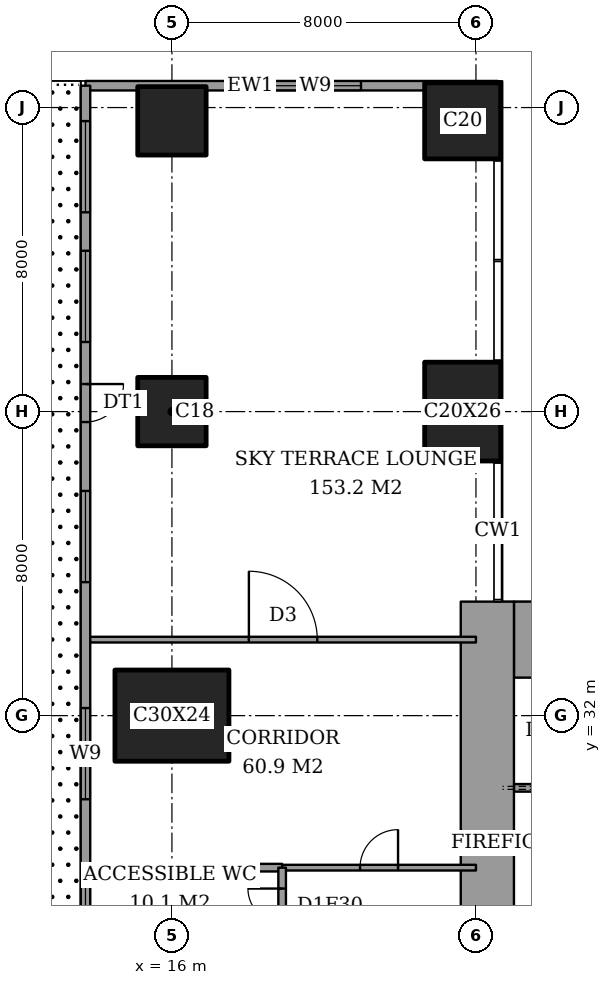
"""IFC4 building model, lengths in metres.
Left out: names, types, materials, properties, quantities, classifications, styles, units other than length and angle.
Written with IfcOpenShell. Run it as: python <this file> out.ifc"""

import sys

from ifc_helpers import new_model, si_unit, direction, frame, frame_2d, origin, origin_2d, place, context, subcontext, project, spatial, rectangle, extrude, element, fill, save


model = new_model("IFC4")
c1 = context("Model", 3, precision=1e-05, world=origin(), true_north=direction((0.0, 1.0)))
c2 = subcontext(c1, "Body", "Model", "MODEL_VIEW")
j1 = project(units=[si_unit("LENGTHUNIT", "METRE"), si_unit("PLANEANGLEUNIT", "RADIAN")], contexts=[c1])
p1 = place(None, origin())
s1 = spatial("IfcSite", under=j1, at=p1, CompositionType="ELEMENT")
p2 = place(p1, origin())
s2 = spatial("IfcBuilding", under=s1, at=p2, CompositionType="ELEMENT")
p3 = place(p2, frame((0.0, 0.0, 221.8)))
s3 = spatial("IfcBuildingStorey", under=s2, at=p3, CompositionType="ELEMENT", Elevation=221.8)
p4 = place(p3, frame((16.0, 32.0, 0.0), z_axis=(0.0, 0.0, 1.0), x_axis=(1.0, 0.0, 0.0)))
e1 = element("IfcColumn", 1, at=p4, inside=s3, PredefinedType="COLUMN", context=c2, shape_type="SweptSolid", body=[
    extrude(rectangle(XDim=3.0, YDim=2.4, at=origin_2d()), origin(), (0.0, 0.0, 1.0), 3.6),
])
for number, where, z_axis, x_axis in (
    (2, (16.0, 40.0, 0.0), (0.0, 0.0, 1.0), (1.0, 0.0, 0.0)),
    (3, (16.0, 47.65, 0.0), (0.0, 0.0, 1.0), (1.0, 0.0, 0.0)),
):
    element("IfcColumn", number, at=place(p3, frame(where, z_axis=z_axis, x_axis=x_axis)), inside=s3, PredefinedType="COLUMN", context=c2, shape_type="SweptSolid", body=[
        extrude(rectangle(XDim=1.8, YDim=1.8, at=origin_2d()), origin(), (0.0, 0.0, 1.0), 3.6),
    ])
p5 = place(p3, frame((23.65, 40.0, 0.0), z_axis=(0.0, 0.0, 1.0), x_axis=(1.0, 0.0, 0.0)))
e4 = element("IfcColumn", 4, at=p5, inside=s3, PredefinedType="COLUMN", context=c2, shape_type="SweptSolid", body=[
    extrude(rectangle(XDim=2.0, YDim=2.6, at=origin_2d()), origin(), (0.0, 0.0, 1.0), 3.6),
])
p6 = place(p3, frame((23.65, 47.65, 0.0), z_axis=(0.0, 0.0, 1.0), x_axis=(1.0, 0.0, 0.0)))
e5 = element("IfcColumn", 5, at=p6, inside=s3, PredefinedType="COLUMN", context=c2, shape_type="SweptSolid", body=[
    extrude(rectangle(XDim=2.0, YDim=2.0, at=origin_2d()), origin(), (0.0, 0.0, 1.0), 3.6),
])
p7 = place(p3, frame((25.0, 34.0, 0.0), z_axis=(0.0, 0.0, 1.0), x_axis=(1.0, 0.0, 0.0)))
e6 = element("IfcWall", 6, at=p7, inside=s3, PredefinedType="SHEAR", context=c2, shape_type="SweptSolid", body=[
    extrude(rectangle(XDim=3.15, YDim=2.0, at=frame_2d((1.575, 0.0))), origin(), (0.0, 0.0, 1.0), 3.6),
])
p8 = place(p3, frame((24.3, 23.15, 0.0), z_axis=(0.0, 0.0, 1.0), x_axis=(0.0, 1.0, 0.0)))
e7 = element("IfcWall", 7, at=p8, inside=s3, PredefinedType="SHEAR", context=c2, shape_type="SweptSolid", body=[
    extrude(rectangle(XDim=11.85, YDim=1.4, at=frame_2d((5.925, 0.0))), origin(), (0.0, 0.0, 1.0), 3.6),
])
p9 = place(p8, frame((0.75, 0.0, 0.0)))
e8 = element("IfcOpeningElement", 8, at=p9, cuts=e7, PredefinedType="OPENING", context=c2, shape_type="SweptSolid", body=[
    extrude(rectangle(XDim=1.8, YDim=2.4, at=frame_2d((0.9, 1.2))), frame((0.0, 0.71, 0.0), z_axis=(0.0, -1.0, 0.0), x_axis=(1.0, 0.0, 0.0)), (0.0, 0.0, 1.0), 1.42),
])
p10 = place(p3, frame((24.575, 48.575, 0.0), z_axis=(0.0, 0.0, 1.0), x_axis=(-1.0, 0.0, 0.0)))
e9 = element("IfcWall", 9, at=p10, inside=s3, PredefinedType="SOLIDWALL", context=c2, shape_type="SweptSolid", body=[
    extrude(rectangle(XDim=10.85, YDim=0.25, at=frame_2d((5.425, 0.0))), origin(), (0.0, 0.0, 1.0), 3.6),
])
p11 = place(p10, frame((3.6, 0.0, 0.2)))
e10 = element("IfcOpeningElement", 10, at=p11, cuts=e9, PredefinedType="OPENING", context=c2, shape_type="SweptSolid", body=[
    extrude(rectangle(XDim=2.4, YDim=2.4, at=frame_2d((1.2, 1.2))), frame((0.0, 0.135, 0.0), z_axis=(0.0, -1.0, 0.0), x_axis=(1.0, 0.0, 0.0)), (0.0, 0.0, 1.0), 0.27),
])
p12 = place(p3, frame((13.725, 48.575, 0.0), z_axis=(0.0, 0.0, 1.0), x_axis=(0.0, -1.0, 0.0)))
e11 = element("IfcWall", 11, at=p12, inside=s3, PredefinedType="SOLIDWALL", context=c2, shape_type="SweptSolid", body=[
    extrude(rectangle(XDim=49.15, YDim=0.25, at=frame_2d((24.575, 0.0))), origin(), (0.0, 0.0, 1.0), 3.6),
])
p13 = place(p12, frame((7.85, 0.0, 0.0)))
e12 = element("IfcOpeningElement", 12, at=p13, cuts=e11, PredefinedType="OPENING", context=c2, shape_type="SweptSolid", body=[
    extrude(rectangle(XDim=1.0, YDim=2.4, at=frame_2d((0.5, 1.2))), frame((0.0, 0.135, 0.0), z_axis=(0.0, -1.0, 0.0), x_axis=(1.0, 0.0, 0.0)), (0.0, 0.0, 1.0), 0.27),
])
p14 = place(p12, frame((0.931, 0.0, 0.2)))
e13 = element("IfcOpeningElement", 13, at=p14, cuts=e11, PredefinedType="OPENING", context=c2, shape_type="SweptSolid", body=[
    extrude(rectangle(XDim=2.4, YDim=2.4, at=frame_2d((1.2, 1.2))), frame((0.0, 0.135, 0.0), z_axis=(0.0, -1.0, 0.0), x_axis=(1.0, 0.0, 0.0)), (0.0, 0.0, 1.0), 0.27),
])
p15 = place(p12, frame((4.344, 0.0, 0.2)))
e14 = element("IfcOpeningElement", 14, at=p15, cuts=e11, PredefinedType="OPENING", context=c2, shape_type="SweptSolid", body=[
    extrude(rectangle(XDim=2.4, YDim=2.4, at=frame_2d((1.2, 1.2))), frame((0.0, 0.135, 0.0), z_axis=(0.0, -1.0, 0.0), x_axis=(1.0, 0.0, 0.0)), (0.0, 0.0, 1.0), 0.27),
])
p16 = place(p12, frame((10.663, 0.0, 0.2)))
e15 = element("IfcOpeningElement", 15, at=p16, cuts=e11, PredefinedType="OPENING", context=c2, shape_type="SweptSolid", body=[
    extrude(rectangle(XDim=2.4, YDim=2.4, at=frame_2d((1.2, 1.2))), frame((0.0, 0.135, 0.0), z_axis=(0.0, -1.0, 0.0), x_axis=(1.0, 0.0, 0.0)), (0.0, 0.0, 1.0), 0.27),
])
p17 = place(p12, frame((16.375, 0.0, 0.2)))
e16 = element("IfcOpeningElement", 16, at=p17, cuts=e11, PredefinedType="OPENING", context=c2, shape_type="SweptSolid", body=[
    extrude(rectangle(XDim=2.4, YDim=2.4, at=frame_2d((1.2, 1.2))), frame((0.0, 0.135, 0.0), z_axis=(0.0, -1.0, 0.0), x_axis=(1.0, 0.0, 0.0)), (0.0, 0.0, 1.0), 0.27),
])
p18 = place(p12, frame((20.975, 0.0, 0.2)))
e17 = element("IfcOpeningElement", 17, at=p18, cuts=e11, PredefinedType="OPENING", context=c2, shape_type="SweptSolid", body=[
    extrude(rectangle(XDim=1.2, YDim=2.4, at=frame_2d((0.6, 1.2))), frame((0.0, 0.135, 0.0), z_axis=(0.0, -1.0, 0.0), x_axis=(1.0, 0.0, 0.0)), (0.0, 0.0, 1.0), 0.27),
])
p19 = place(p12, frame((22.975, 0.0, 0.2)))
e18 = element("IfcOpeningElement", 18, at=p19, cuts=e11, PredefinedType="OPENING", context=c2, shape_type="SweptSolid", body=[
    extrude(rectangle(XDim=1.2, YDim=2.4, at=frame_2d((0.6, 1.2))), frame((0.0, 0.135, 0.0), z_axis=(0.0, -1.0, 0.0), x_axis=(1.0, 0.0, 0.0)), (0.0, 0.0, 1.0), 0.27),
])
p20 = place(p12, frame((25.375, 0.0, 0.2)))
e19 = element("IfcOpeningElement", 19, at=p20, cuts=e11, PredefinedType="OPENING", context=c2, shape_type="SweptSolid", body=[
    extrude(rectangle(XDim=2.4, YDim=2.4, at=frame_2d((1.2, 1.2))), frame((0.0, 0.135, 0.0), z_axis=(0.0, -1.0, 0.0), x_axis=(1.0, 0.0, 0.0)), (0.0, 0.0, 1.0), 0.27),
])
p21 = place(p12, frame((30.375, 0.0, 0.2)))
e20 = element("IfcOpeningElement", 20, at=p21, cuts=e11, PredefinedType="OPENING", context=c2, shape_type="SweptSolid", body=[
    extrude(rectangle(XDim=2.4, YDim=2.4, at=frame_2d((1.2, 1.2))), frame((0.0, 0.135, 0.0), z_axis=(0.0, -1.0, 0.0), x_axis=(1.0, 0.0, 0.0)), (0.0, 0.0, 1.0), 0.27),
])
p22 = place(p12, frame((41.3, 0.0, 0.0)))
e21 = element("IfcOpeningElement", 21, at=p22, cuts=e11, PredefinedType="OPENING", context=c2, shape_type="SweptSolid", body=[
    extrude(rectangle(XDim=1.0, YDim=2.4, at=frame_2d((0.5, 1.2))), frame((0.0, 0.135, 0.0), z_axis=(0.0, -1.0, 0.0), x_axis=(1.0, 0.0, 0.0)), (0.0, 0.0, 1.0), 0.27),
])
p23 = place(p12, frame((36.587, 0.0, 0.2)))
e22 = element("IfcOpeningElement", 22, at=p23, cuts=e11, PredefinedType="OPENING", context=c2, shape_type="SweptSolid", body=[
    extrude(rectangle(XDim=2.4, YDim=2.4, at=frame_2d((1.2, 1.2))), frame((0.0, 0.135, 0.0), z_axis=(0.0, -1.0, 0.0), x_axis=(1.0, 0.0, 0.0)), (0.0, 0.0, 1.0), 0.27),
])
p24 = place(p12, frame((44.613, 0.0, 0.2)))
e23 = element("IfcOpeningElement", 23, at=p24, cuts=e11, PredefinedType="OPENING", context=c2, shape_type="SweptSolid", body=[
    extrude(rectangle(XDim=2.4, YDim=2.4, at=frame_2d((1.2, 1.2))), frame((0.0, 0.135, 0.0), z_axis=(0.0, -1.0, 0.0), x_axis=(1.0, 0.0, 0.0)), (0.0, 0.0, 1.0), 0.27),
])
p25 = place(p3, frame((13.85, 28.0, 0.0), z_axis=(0.0, 0.0, 1.0), x_axis=(1.0, 0.0, 0.0)))
e24 = element("IfcWall", 24, at=p25, inside=s3, PredefinedType="PARTITIONING", context=c2, shape_type="SweptSolid", body=[
    extrude(rectangle(XDim=5.05, YDim=0.2, at=frame_2d((2.525, 0.0))), origin(), (0.0, 0.0, 1.0), 3.25),
])
p26 = place(p3, frame((18.9, 28.0, 0.0), z_axis=(0.0, 0.0, 1.0), x_axis=(1.0, 0.0, 0.0)))
e25 = element("IfcWall", 25, at=p26, inside=s3, PredefinedType="PARTITIONING", context=c2, shape_type="SweptSolid", body=[
    extrude(rectangle(XDim=5.1, YDim=0.15, at=frame_2d((2.55, 0.0))), origin(), (0.0, 0.0, 1.0), 3.25),
])
p27 = place(p26, frame((2.05, 0.0, 0.0)))
e26 = element("IfcOpeningElement", 26, at=p27, cuts=e25, PredefinedType="OPENING", context=c2, shape_type="SweptSolid", body=[
    extrude(rectangle(XDim=1.0, YDim=2.1, at=frame_2d((0.5, 1.05))), frame((0.0, 0.085, 0.0), z_axis=(0.0, -1.0, 0.0), x_axis=(1.0, 0.0, 0.0)), (0.0, 0.0, 1.0), 0.17),
])
p28 = place(p3, frame((13.85, 34.0, 0.0), z_axis=(0.0, 0.0, 1.0), x_axis=(1.0, 0.0, 0.0)))
e27 = element("IfcWall", 27, at=p28, inside=s3, PredefinedType="PARTITIONING", context=c2, shape_type="SweptSolid", body=[
    extrude(rectangle(XDim=10.15, YDim=0.15, at=frame_2d((5.075, 0.0))), origin(), (0.0, 0.0, 1.0), 3.25),
])
p29 = place(p28, frame((4.175, 0.0, 0.0)))
e28 = element("IfcOpeningElement", 28, at=p29, cuts=e27, PredefinedType="OPENING", context=c2, shape_type="SweptSolid", body=[
    extrude(rectangle(XDim=1.8, YDim=2.1, at=frame_2d((0.9, 1.05))), frame((0.0, 0.085, 0.0), z_axis=(0.0, -1.0, 0.0), x_axis=(1.0, 0.0, 0.0)), (0.0, 0.0, 1.0), 0.17),
])
p30 = place(p3, frame((18.9, 20.0, 0.0), z_axis=(0.0, 0.0, 1.0), x_axis=(0.0, 1.0, 0.0)))
e29 = element("IfcWall", 29, at=p30, inside=s3, PredefinedType="PARTITIONING", context=c2, shape_type="SweptSolid", body=[
    extrude(rectangle(XDim=8.0, YDim=0.2, at=frame_2d((4.0, 0.0))), origin(), (0.0, 0.0, 1.0), 3.25),
])
p31 = place(p30, frame((1.55, 0.0, 0.0)))
e30 = element("IfcOpeningElement", 30, at=p31, cuts=e29, PredefinedType="OPENING", context=c2, shape_type="SweptSolid", body=[
    extrude(rectangle(XDim=0.9, YDim=2.1, at=frame_2d((0.45, 1.05))), frame((0.0, 0.11, 0.0), z_axis=(0.0, -1.0, 0.0), x_axis=(1.0, 0.0, 0.0)), (0.0, 0.0, 1.0), 0.22),
])
p32 = place(p30, frame((4.55, 0.0, 0.0)))
e31 = element("IfcOpeningElement", 31, at=p32, cuts=e29, PredefinedType="OPENING", context=c2, shape_type="SweptSolid", body=[
    extrude(rectangle(XDim=0.9, YDim=2.1, at=frame_2d((0.45, 1.05))), frame((0.0, 0.11, 0.0), z_axis=(0.0, -1.0, 0.0), x_axis=(1.0, 0.0, 0.0)), (0.0, 0.0, 1.0), 0.22),
])
p33 = place(p30, frame((6.55, 0.0, 0.0)))
e32 = element("IfcOpeningElement", 32, at=p33, cuts=e29, PredefinedType="OPENING", context=c2, shape_type="SweptSolid", body=[
    extrude(rectangle(XDim=0.9, YDim=2.1, at=frame_2d((0.45, 1.05))), frame((0.0, 0.11, 0.0), z_axis=(0.0, -1.0, 0.0), x_axis=(1.0, 0.0, 0.0)), (0.0, 0.0, 1.0), 0.22),
])
p34 = place(p3, frame((25.0, 30.1, 0.0), z_axis=(0.0, 0.0, 1.0), x_axis=(1.0, 0.0, 0.0)))
e33 = element("IfcWall", 33, at=p34, inside=s3, PredefinedType="PARTITIONING", context=c2, shape_type="SweptSolid", body=[
    extrude(rectangle(XDim=12.7, YDim=0.2, at=frame_2d((6.35, 0.0))), origin(), (0.0, 0.0, 1.0), 3.6),
])
p35 = place(p34, frame((4.25, 0.0, 0.0)))
e34 = element("IfcOpeningElement", 34, at=p35, cuts=e33, PredefinedType="OPENING", context=c2, shape_type="SweptSolid", body=[
    extrude(rectangle(XDim=1.1, YDim=2.1, at=frame_2d((0.55, 1.05))), frame((0.0, 0.11, 0.0), z_axis=(0.0, -1.0, 0.0), x_axis=(1.0, 0.0, 0.0)), (0.0, 0.0, 1.0), 0.22),
])
p36 = place(p34, frame((7.45, 0.0, 0.0)))
e35 = element("IfcOpeningElement", 35, at=p36, cuts=e33, PredefinedType="OPENING", context=c2, shape_type="SweptSolid", body=[
    extrude(rectangle(XDim=1.1, YDim=2.1, at=frame_2d((0.55, 1.05))), frame((0.0, 0.11, 0.0), z_axis=(0.0, -1.0, 0.0), x_axis=(1.0, 0.0, 0.0)), (0.0, 0.0, 1.0), 0.22),
])
p37 = place(p34, frame((10.65, 0.0, 0.0)))
e36 = element("IfcOpeningElement", 36, at=p37, cuts=e33, PredefinedType="OPENING", context=c2, shape_type="SweptSolid", body=[
    extrude(rectangle(XDim=1.1, YDim=2.1, at=frame_2d((0.55, 1.05))), frame((0.0, 0.11, 0.0), z_axis=(0.0, -1.0, 0.0), x_axis=(1.0, 0.0, 0.0)), (0.0, 0.0, 1.0), 0.22),
])
p38 = place(p34, frame((0.9, 0.0, 0.0)))
e37 = element("IfcOpeningElement", 37, at=p38, cuts=e33, PredefinedType="OPENING", context=c2, shape_type="SweptSolid", body=[
    extrude(rectangle(XDim=1.2, YDim=2.1, at=frame_2d((0.6, 1.05))), frame((0.0, 0.11, 0.0), z_axis=(0.0, -1.0, 0.0), x_axis=(1.0, 0.0, 0.0)), (0.0, 0.0, 1.0), 0.22),
])
p39 = place(p11, origin())
e38 = element("IfcWindow", 38, at=p39, inside=s3, PartitioningType="SINGLE_PANEL", PredefinedType="WINDOW", context=c2, shape_type="SweptSolid", body=[
    extrude(rectangle(XDim=2.4, YDim=2.4, at=frame_2d((1.2, 1.2))), frame((0.0, 0.03, 0.0), z_axis=(0.0, -1.0, 0.0), x_axis=(1.0, 0.0, 0.0)), (0.0, 0.0, 1.0), 0.06),
])
fill(e10, e38)
p40 = place(p13, origin())
e39 = element("IfcDoor", 39, at=p40, inside=s3, OperationType="SINGLE_SWING_RIGHT", PredefinedType="DOOR", context=c2, shape_type="SweptSolid", body=[
    extrude(rectangle(XDim=1.0, YDim=2.4, at=frame_2d((0.5, 1.2))), frame((0.0, 0.025, 0.0), z_axis=(0.0, -1.0, 0.0), x_axis=(1.0, 0.0, 0.0)), (0.0, 0.0, 1.0), 0.05),
])
fill(e12, e39)
p41 = place(p14, origin())
e40 = element("IfcWindow", 40, at=p41, inside=s3, PartitioningType="SINGLE_PANEL", PredefinedType="WINDOW", context=c2, shape_type="SweptSolid", body=[
    extrude(rectangle(XDim=2.4, YDim=2.4, at=frame_2d((1.2, 1.2))), frame((0.0, 0.03, 0.0), z_axis=(0.0, -1.0, 0.0), x_axis=(1.0, 0.0, 0.0)), (0.0, 0.0, 1.0), 0.06),
])
fill(e13, e40)
p42 = place(p15, origin())
e41 = element("IfcWindow", 41, at=p42, inside=s3, PartitioningType="SINGLE_PANEL", PredefinedType="WINDOW", context=c2, shape_type="SweptSolid", body=[
    extrude(rectangle(XDim=2.4, YDim=2.4, at=frame_2d((1.2, 1.2))), frame((0.0, 0.03, 0.0), z_axis=(0.0, -1.0, 0.0), x_axis=(1.0, 0.0, 0.0)), (0.0, 0.0, 1.0), 0.06),
])
fill(e14, e41)
p43 = place(p16, origin())
e42 = element("IfcWindow", 42, at=p43, inside=s3, PartitioningType="SINGLE_PANEL", PredefinedType="WINDOW", context=c2, shape_type="SweptSolid", body=[
    extrude(rectangle(XDim=2.4, YDim=2.4, at=frame_2d((1.2, 1.2))), frame((0.0, 0.03, 0.0), z_axis=(0.0, -1.0, 0.0), x_axis=(1.0, 0.0, 0.0)), (0.0, 0.0, 1.0), 0.06),
])
fill(e15, e42)
p44 = place(p17, origin())
e43 = element("IfcWindow", 43, at=p44, inside=s3, PartitioningType="SINGLE_PANEL", PredefinedType="WINDOW", context=c2, shape_type="SweptSolid", body=[
    extrude(rectangle(XDim=2.4, YDim=2.4, at=frame_2d((1.2, 1.2))), frame((0.0, 0.03, 0.0), z_axis=(0.0, -1.0, 0.0), x_axis=(1.0, 0.0, 0.0)), (0.0, 0.0, 1.0), 0.06),
])
fill(e16, e43)
p45 = place(p18, origin())
e44 = element("IfcWindow", 44, at=p45, inside=s3, PartitioningType="SINGLE_PANEL", PredefinedType="WINDOW", context=c2, shape_type="SweptSolid", body=[
    extrude(rectangle(XDim=1.2, YDim=2.4, at=frame_2d((0.6, 1.2))), frame((0.0, 0.03, 0.0), z_axis=(0.0, -1.0, 0.0), x_axis=(1.0, 0.0, 0.0)), (0.0, 0.0, 1.0), 0.06),
])
fill(e17, e44)
p46 = place(p29, origin())
e45 = element("IfcDoor", 45, at=p46, inside=s3, OperationType="DOUBLE_DOOR_DOUBLE_SWING", PredefinedType="DOOR", context=c2, shape_type="SweptSolid", body=[
    extrude(rectangle(XDim=1.8, YDim=2.1, at=frame_2d((0.9, 1.05))), frame((0.0, 0.025, 0.0), z_axis=(0.0, -1.0, 0.0), x_axis=(1.0, 0.0, 0.0)), (0.0, 0.0, 1.0), 0.05),
])
fill(e28, e45)
p47 = place(p27, origin())
e46 = element("IfcDoor", 46, at=p47, inside=s3, OperationType="SINGLE_SWING_LEFT", PredefinedType="DOOR", context=c2, shape_type="SweptSolid", body=[
    extrude(rectangle(XDim=1.0, YDim=2.1, at=frame_2d((0.5, 1.05))), frame((0.0, 0.025, 0.0), z_axis=(0.0, -1.0, 0.0), x_axis=(1.0, 0.0, 0.0)), (0.0, 0.0, 1.0), 0.05),
])
fill(e26, e46)
p48 = place(p33, origin())
e47 = element("IfcDoor", 47, at=p48, inside=s3, OperationType="SINGLE_SWING_LEFT", PredefinedType="DOOR", context=c2, shape_type="SweptSolid", body=[
    extrude(rectangle(XDim=0.9, YDim=2.1, at=frame_2d((0.45, 1.05))), frame((0.0, 0.025, 0.0), z_axis=(0.0, -1.0, 0.0), x_axis=(1.0, 0.0, 0.0)), (0.0, 0.0, 1.0), 0.05),
])
fill(e32, e47)
save(model, sys.argv[1])
